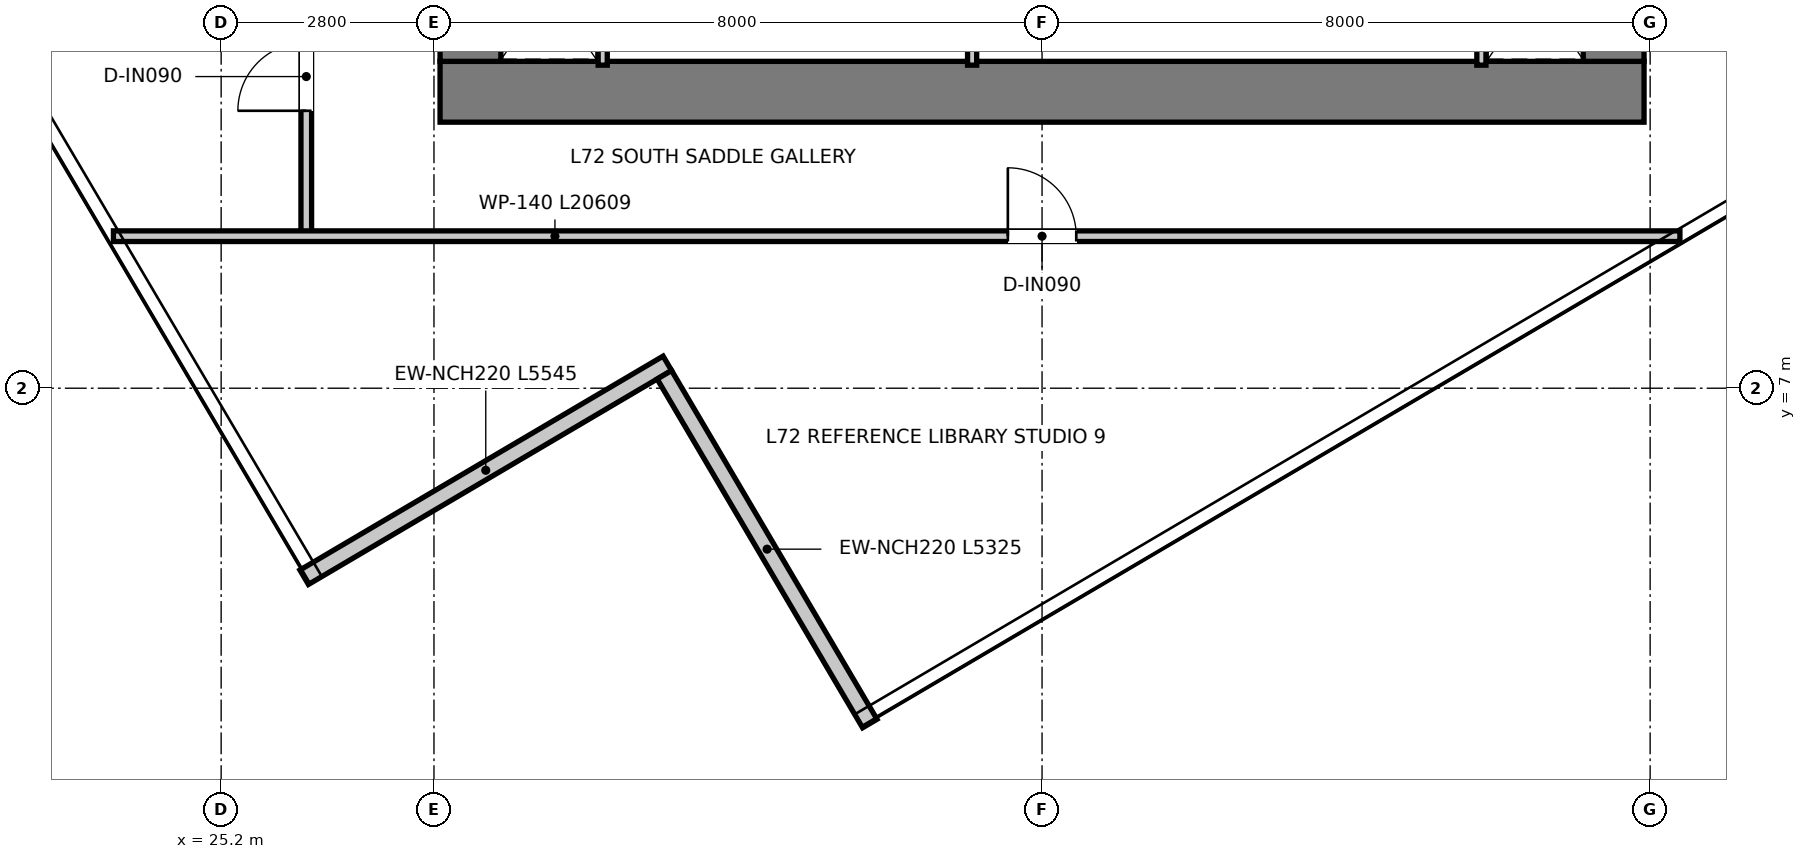
"""IFC4 building model, lengths in metres.
Left out: names, types, materials, properties, quantities, classifications, styles, units other than length and angle.
Written with IfcOpenShell. Run it as: python <this file> out.ifc"""

import sys

from ifc_helpers import new_model, si_unit, direction, frame, frame_2d, origin, place, context, subcontext, project, spatial, rectangle, extrude, element, fill, save


model = new_model("IFC4")
c1 = context("Model", 3, precision=1e-05, world=origin(), true_north=direction((0.0, 1.0)))
c2 = subcontext(c1, "Body", "Model", "MODEL_VIEW")
j1 = project(units=[si_unit("LENGTHUNIT", "METRE"), si_unit("PLANEANGLEUNIT", "RADIAN")], contexts=[c1])
p1 = place(None, origin())
s1 = spatial("IfcSite", under=j1, at=p1, CompositionType="ELEMENT")
p2 = place(p1, origin())
s2 = spatial("IfcBuilding", under=s1, at=p2, CompositionType="ELEMENT")
p3 = place(p2, frame((0.0, 0.0, 295.05)))
s3 = spatial("IfcBuildingStorey", under=s2, at=p3, CompositionType="ELEMENT", Elevation=295.05)
p4 = place(p3, frame((28.08, 10.9, 0.0), z_axis=(0.0, 0.0, 1.0), x_axis=(1.0, 0.0, 0.0)))
e1 = element("IfcWall", 1, at=p4, inside=s3, PredefinedType="SHEAR", context=c2, shape_type="SweptSolid", body=[
    extrude(rectangle(XDim=15.84, YDim=0.8, at=frame_2d((7.92, 0.0))), origin(), (0.0, 0.0, 1.0), 3.95),
])
for number, where, z_axis, x_axis in (
    (2, (28.48, 11.3, 0.0), (0.0, 0.0, 1.0), (0.0, 1.0, 0.0)),
    (3, (43.52, 11.3, 0.0), (0.0, 0.0, 1.0), (0.0, 1.0, 0.0)),
):
    element("IfcWall", number, at=place(p3, frame(where, z_axis=z_axis, x_axis=x_axis)), inside=s3, PredefinedType="SHEAR", context=c2, shape_type="SweptSolid", body=[
        extrude(rectangle(XDim=14.7, YDim=0.8, at=frame_2d((7.35, 0.0))), origin(), (0.0, 0.0, 1.0), 3.95),
    ])
p5 = place(p3, frame((26.292, 4.513, 0.0), z_axis=(0.0, 0.0, 1.0), x_axis=(0.861621670092, 0.507551078836, 0.0)))
e4 = element("IfcWall", 4, at=p5, inside=s3, PredefinedType="ELEMENTEDWALL", context=c2, shape_type="SweptSolid", body=[
    extrude(rectangle(XDim=5.545, YDim=0.22, at=frame_2d((2.772, 0.0))), origin(), (0.0, 0.0, 1.0), 3.67),
])
p6 = place(p3, frame((31.031, 7.177, 0.0), z_axis=(0.0, 0.0, 1.0), x_axis=(0.507540984104, -0.861627616465, 0.0)))
e5 = element("IfcWall", 5, at=p6, inside=s3, PredefinedType="ELEMENTEDWALL", context=c2, shape_type="SweptSolid", body=[
    extrude(rectangle(XDim=5.325, YDim=0.22, at=frame_2d((2.663, 0.0))), origin(), (0.0, 0.0, 1.0), 3.67),
])
for number, where, z_axis, x_axis in (
    (6, (30.22, 11.25, 0.0), (0.0, 0.0, 1.0), (0.0, 1.0, 0.0)),
    (7, (41.78, 11.25, 0.0), (0.0, 0.0, 1.0), (0.0, 1.0, 0.0)),
):
    element("IfcWall", number, at=place(p3, frame(where, z_axis=z_axis, x_axis=x_axis)), inside=s3, PredefinedType="PARTITIONING", context=c2, shape_type="SweptSolid", body=[
        extrude(rectangle(XDim=1.97, YDim=0.12, at=frame_2d((0.985, 0.0))), origin(), (0.0, 0.0, 1.0), 3.67),
    ])
p7 = place(p3, frame((35.08, 11.25, 0.0), z_axis=(0.0, 0.0, 1.0), x_axis=(0.0, 1.0, 0.0)))
e8 = element("IfcWall", 8, at=p7, inside=s3, PredefinedType="PARTITIONING", context=c2, shape_type="SweptSolid", body=[
    extrude(rectangle(XDim=1.97, YDim=0.12, at=frame_2d((0.985, 0.0))), origin(), (0.0, 0.0, 1.0), 3.67),
])
p8 = place(p7, frame((0.545, 0.0, 0.0)))
e9 = element("IfcOpeningElement", 9, at=p8, cuts=e8, PredefinedType="OPENING", context=c2, shape_type="SweptSolid", body=[
    extrude(rectangle(XDim=0.85, YDim=2.1, at=frame_2d((0.425, 1.05))), frame((0.0, 0.07, 0.0), z_axis=(0.0, -1.0, 0.0), x_axis=(1.0, 0.0, 0.0)), (0.0, 0.0, 1.0), 0.14),
])
p9 = place(p3, frame((26.32, 9.0, 0.0), z_axis=(0.0, 0.0, 1.0), x_axis=(0.0, 1.0, 0.0)))
e10 = element("IfcWall", 10, at=p9, inside=s3, PredefinedType="PARTITIONING", context=c2, shape_type="SweptSolid", body=[
    extrude(rectangle(XDim=19.66, YDim=0.14, at=frame_2d((9.83, 0.0))), origin(), (0.0, 0.0, 1.0), 3.13),
])
p10 = place(p9, frame((18.3, 0.0, 0.0)))
e11 = element("IfcOpeningElement", 11, at=p10, cuts=e10, PredefinedType="OPENING", context=c2, shape_type="SweptSolid", body=[
    extrude(rectangle(XDim=0.9, YDim=2.1, at=frame_2d((0.45, 1.05))), frame((0.0, 0.08, 0.0), z_axis=(0.0, -1.0, 0.0), x_axis=(1.0, 0.0, 0.0)), (0.0, 0.0, 1.0), 0.16),
])
p11 = place(p9, frame((1.65, 0.0, 0.0)))
e12 = element("IfcOpeningElement", 12, at=p11, cuts=e10, PredefinedType="OPENING", context=c2, shape_type="SweptSolid", body=[
    extrude(rectangle(XDim=0.9, YDim=2.1, at=frame_2d((0.45, 1.05))), frame((0.0, 0.08, 0.0), z_axis=(0.0, -1.0, 0.0), x_axis=(1.0, 0.0, 0.0)), (0.0, 0.0, 1.0), 0.16),
])
p12 = place(p9, frame((8.7, 0.0, 0.0)))
e13 = element("IfcOpeningElement", 13, at=p12, cuts=e10, PredefinedType="OPENING", context=c2, shape_type="SweptSolid", body=[
    extrude(rectangle(XDim=0.9, YDim=2.1, at=frame_2d((0.45, 1.05))), frame((0.0, 0.08, 0.0), z_axis=(0.0, -1.0, 0.0), x_axis=(1.0, 0.0, 0.0)), (0.0, 0.0, 1.0), 0.16),
])
p13 = place(p9, frame((11.85, 0.0, 0.0)))
e14 = element("IfcOpeningElement", 14, at=p13, cuts=e10, PredefinedType="OPENING", context=c2, shape_type="SweptSolid", body=[
    extrude(rectangle(XDim=0.9, YDim=2.1, at=frame_2d((0.45, 1.05))), frame((0.0, 0.08, 0.0), z_axis=(0.0, -1.0, 0.0), x_axis=(1.0, 0.0, 0.0)), (0.0, 0.0, 1.0), 0.16),
])
p14 = place(p9, frame((15.86, 0.0, 0.0)))
e15 = element("IfcOpeningElement", 15, at=p14, cuts=e10, PredefinedType="OPENING", context=c2, shape_type="SweptSolid", body=[
    extrude(rectangle(XDim=0.9, YDim=2.1, at=frame_2d((0.45, 1.05))), frame((0.0, 0.08, 0.0), z_axis=(0.0, -1.0, 0.0), x_axis=(1.0, 0.0, 0.0)), (0.0, 0.0, 1.0), 0.16),
])
p15 = place(p3, frame((23.783, 9.0, 0.0), z_axis=(0.0, 0.0, 1.0), x_axis=(1.0, 0.0, 0.0)))
e16 = element("IfcWall", 16, at=p15, inside=s3, PredefinedType="PARTITIONING", context=c2, shape_type="SweptSolid", body=[
    extrude(rectangle(XDim=20.609, YDim=0.14, at=frame_2d((10.304, 0.0))), origin(), (0.0, 0.0, 1.0), 3.67),
])
p16 = place(p15, frame((11.767, 0.0, 0.0)))
e17 = element("IfcOpeningElement", 17, at=p16, cuts=e16, PredefinedType="OPENING", context=c2, shape_type="SweptSolid", body=[
    extrude(rectangle(XDim=0.9, YDim=2.1, at=frame_2d((0.45, 1.05))), frame((0.0, 0.08, 0.0), z_axis=(0.0, -1.0, 0.0), x_axis=(1.0, 0.0, 0.0)), (0.0, 0.0, 1.0), 0.16),
])
p17 = place(p11, origin())
e18 = element("IfcDoor", 18, at=p17, inside=s3, OperationType="SINGLE_SWING_LEFT", PredefinedType="DOOR", context=c2, shape_type="SweptSolid", body=[
    extrude(rectangle(XDim=0.9, YDim=2.1, at=frame_2d((0.45, 1.05))), frame((0.0, 0.025, 0.0), z_axis=(0.0, -1.0, 0.0), x_axis=(1.0, 0.0, 0.0)), (0.0, 0.0, 1.0), 0.05),
])
fill(e12, e18)
p18 = place(p16, origin())
e19 = element("IfcDoor", 19, at=p18, inside=s3, OperationType="SINGLE_SWING_LEFT", PredefinedType="DOOR", context=c2, shape_type="SweptSolid", body=[
    extrude(rectangle(XDim=0.9, YDim=2.1, at=frame_2d((0.45, 1.05))), frame((0.0, 0.025, 0.0), z_axis=(0.0, -1.0, 0.0), x_axis=(1.0, 0.0, 0.0)), (0.0, 0.0, 1.0), 0.05),
])
fill(e17, e19)
save(model, sys.argv[1])
